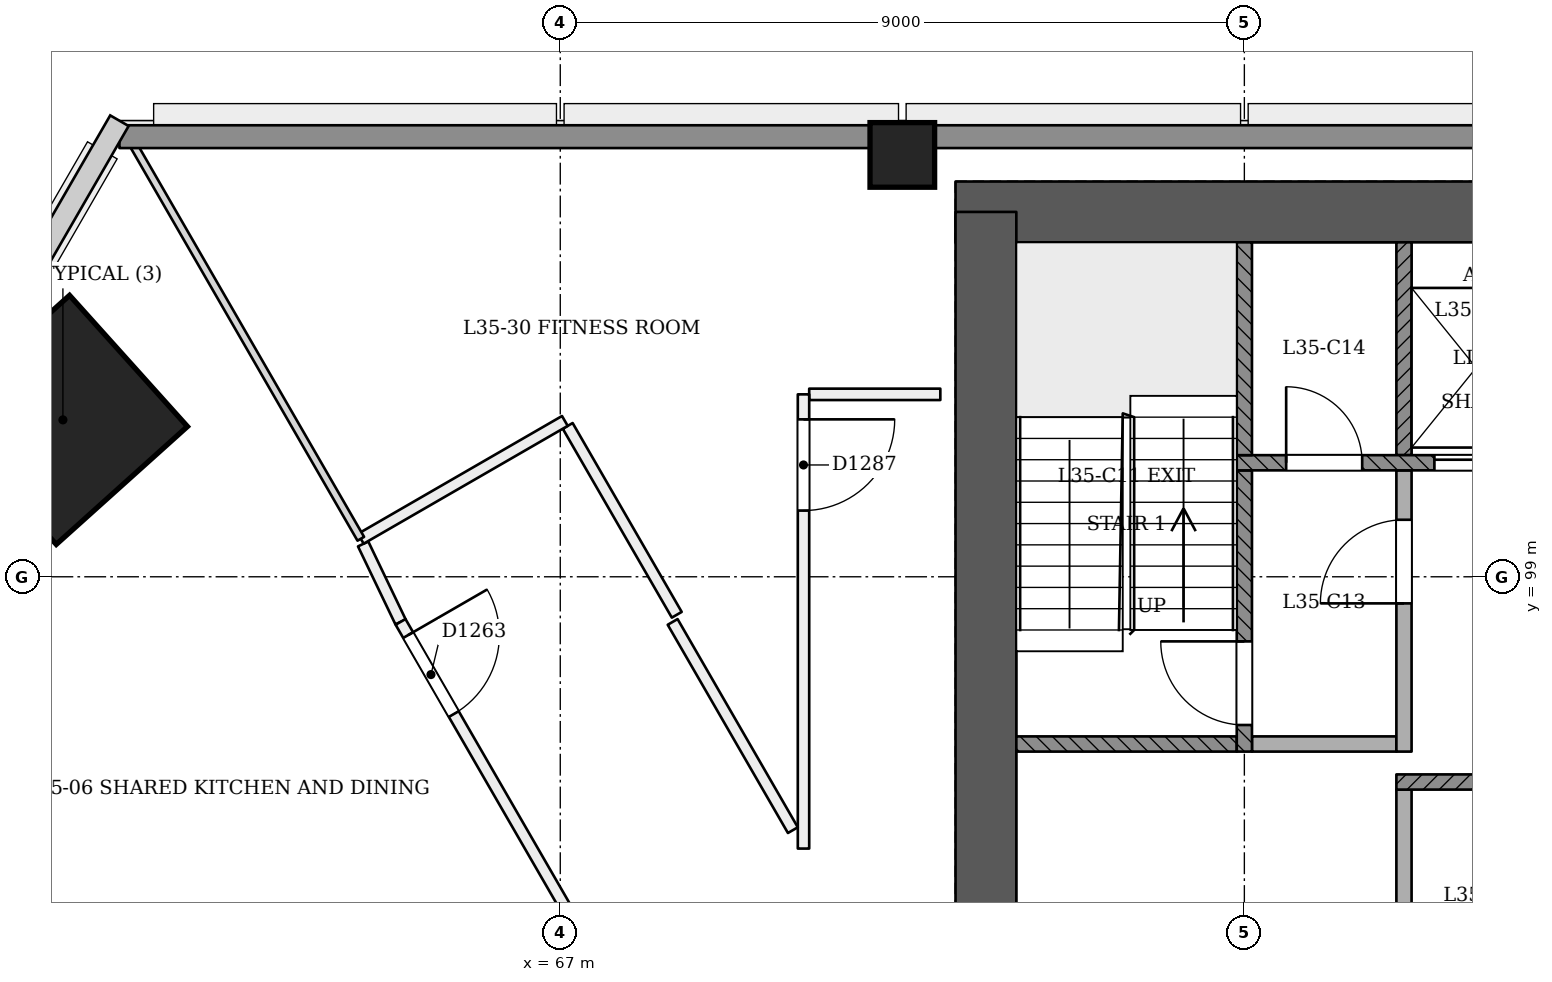
"""IFC4 building model, lengths in metres.
Left out: names, types, materials, properties, quantities, classifications, styles, units other than length and angle.
Written with IfcOpenShell. Run it as: python <this file> out.ifc"""

import sys

from ifc_helpers import new_model, si_unit, direction, frame, frame_2d, origin, origin_2d, place, context, subcontext, project, spatial, rectangle, extrude, element, fill, save


model = new_model("IFC4")
c1 = context("Model", 3, precision=1e-05, world=origin(), true_north=direction((0.0, 1.0)))
c2 = subcontext(c1, "Body", "Model", "MODEL_VIEW")
j1 = project(units=[si_unit("LENGTHUNIT", "METRE"), si_unit("PLANEANGLEUNIT", "RADIAN")], contexts=[c1])
p1 = place(None, origin())
s1 = spatial("IfcSite", under=j1, at=p1, CompositionType="ELEMENT")
p2 = place(p1, origin())
s2 = spatial("IfcBuilding", under=s1, at=p2, CompositionType="ELEMENT")
p3 = place(p2, frame((0.0, 0.0, 138.6)))
s3 = spatial("IfcBuildingStorey", under=s2, at=p3, CompositionType="ELEMENT", Elevation=138.6)
p4 = place(p3, frame((97.4, 103.8, 0.0), z_axis=(0.0, 0.0, 1.0), x_axis=(-1.0, 0.0, 0.0)))
e1 = element("IfcWall", 1, at=p4, inside=s3, PredefinedType="SHEAR", context=c2, shape_type="SweptSolid", body=[
    extrude(rectangle(XDim=25.2, YDim=0.8, at=frame_2d((12.6, 0.0))), origin(), (0.0, 0.0, 1.0), 3.6),
])
p5 = place(p3, frame((72.6, 103.8, 0.0), z_axis=(0.0, 0.0, 1.0), x_axis=(0.0, -1.0, 0.0)))
e2 = element("IfcWall", 2, at=p5, inside=s3, PredefinedType="SHEAR", context=c2, shape_type="SweptSolid", body=[
    extrude(rectangle(XDim=11.2, YDim=0.8, at=frame_2d((5.6, 0.0))), origin(), (0.0, 0.0, 1.0), 3.6),
])
p6 = place(p3, frame((60.423, 101.053, 0.0), z_axis=(0.028403721265, 0.009287135593, 0.999553389135), x_axis=(-0.866201877506, 0.49929479911, 0.019975259356)))
e3 = element("IfcColumn", 3, at=p6, inside=s3, PredefinedType="COLUMN", context=c2, shape_type="SweptSolid", body=[
    extrude(rectangle(XDim=2.32, YDim=2.32, at=origin_2d()), origin(), (0.0, 0.0, 1.0), 3.602),
])
p7 = place(p3, frame((71.5, 104.55, 0.0), z_axis=(0.0, 0.0, 1.0), x_axis=(1.0, 0.0, 0.0)))
e4 = element("IfcColumn", 4, at=p7, inside=s3, PredefinedType="COLUMN", context=c2, shape_type="SweptSolid", body=[
    extrude(rectangle(XDim=0.85, YDim=0.85, at=origin_2d()), origin(), (0.0, 0.0, 1.0), 3.6),
])
p8 = place(p3, frame((64.407, 99.432, 0.0), z_axis=(0.0, 0.0, 1.0), x_axis=(0.432647343943, -0.901563240033, 0.0)))
e5 = element("IfcWall", 5, at=p8, inside=s3, PredefinedType="PARTITIONING", context=c2, shape_type="SweptSolid", body=[
    extrude(rectangle(XDim=1.138, YDim=0.15, at=frame_2d((0.569, 0.0))), origin(), (0.0, 0.0, 1.0), 3.15),
])
p9 = place(p3, frame((64.899, 98.406, 0.0), z_axis=(0.0, 0.0, 1.0), x_axis=(0.499995137693, -0.86602821102, 0.0)))
e6 = element("IfcWall", 6, at=p9, inside=s3, PredefinedType="PARTITIONING", context=c2, shape_type="SweptSolid", body=[
    extrude(rectangle(XDim=40.094, YDim=0.15, at=frame_2d((20.047, 0.0))), origin(), (0.0, 0.0, 1.0), 2.75),
])
p10 = place(p9, frame((0.2, 0.0, 0.0)))
e7 = element("IfcOpeningElement", 7, at=p10, cuts=e6, PredefinedType="OPENING", context=c2, shape_type="SweptSolid", body=[
    extrude(rectangle(XDim=1.2, YDim=2.1, at=frame_2d((0.6, 1.05))), frame((0.0, 0.085, 0.0), z_axis=(0.0, -1.0, 0.0), x_axis=(1.0, 0.0, 0.0)), (0.0, 0.0, 1.0), 0.171),
])
p11 = place(p9, frame((9.442, 0.0, 0.0)))
e8 = element("IfcOpeningElement", 8, at=p11, cuts=e6, PredefinedType="OPENING", context=c2, shape_type="SweptSolid", body=[
    extrude(rectangle(XDim=1.0, YDim=2.1, at=frame_2d((0.5, 1.05))), frame((0.0, 0.085, 0.0), z_axis=(0.0, -1.0, 0.0), x_axis=(1.0, 0.0, 0.0)), (0.0, 0.0, 1.0), 0.171),
])
p12 = place(p9, frame((11.652, 0.0, 0.0)))
e9 = element("IfcOpeningElement", 9, at=p12, cuts=e6, PredefinedType="OPENING", context=c2, shape_type="SweptSolid", body=[
    extrude(rectangle(XDim=1.0, YDim=2.1, at=frame_2d((0.5, 1.05))), frame((0.0, 0.085, 0.0), z_axis=(0.0, -1.0, 0.0), x_axis=(1.0, 0.0, 0.0)), (0.0, 0.0, 1.0), 0.171),
])
p13 = place(p9, frame((19.447, 0.0, 0.0)))
e10 = element("IfcOpeningElement", 10, at=p13, cuts=e6, PredefinedType="OPENING", context=c2, shape_type="SweptSolid", body=[
    extrude(rectangle(XDim=1.2, YDim=2.1, at=frame_2d((0.6, 1.05))), frame((0.0, 0.085, 0.0), z_axis=(0.0, -1.0, 0.0), x_axis=(1.0, 0.0, 0.0)), (0.0, 0.0, 1.0), 0.171),
])
p14 = place(p9, frame((27.327, 0.0, 0.0)))
e11 = element("IfcOpeningElement", 11, at=p14, cuts=e6, PredefinedType="OPENING", context=c2, shape_type="SweptSolid", body=[
    extrude(rectangle(XDim=1.0, YDim=2.1, at=frame_2d((0.5, 1.05))), frame((0.0, 0.085, 0.0), z_axis=(0.0, -1.0, 0.0), x_axis=(1.0, 0.0, 0.0)), (0.0, 0.0, 1.0), 0.171),
])
p15 = place(p9, frame((31.847, 0.0, 0.0)))
e12 = element("IfcOpeningElement", 12, at=p15, cuts=e6, PredefinedType="OPENING", context=c2, shape_type="SweptSolid", body=[
    extrude(rectangle(XDim=1.2, YDim=2.1, at=frame_2d((0.6, 1.05))), frame((0.0, 0.085, 0.0), z_axis=(0.0, -1.0, 0.0), x_axis=(1.0, 0.0, 0.0)), (0.0, 0.0, 1.0), 0.171),
])
p16 = place(p9, frame((38.558, 0.0, 0.0)))
e13 = element("IfcOpeningElement", 13, at=p16, cuts=e6, PredefinedType="OPENING", context=c2, shape_type="SweptSolid", body=[
    extrude(rectangle(XDim=1.0, YDim=2.1, at=frame_2d((0.5, 1.05))), frame((0.0, 0.085, 0.0), z_axis=(0.0, -1.0, 0.0), x_axis=(1.0, 0.0, 0.0)), (0.0, 0.0, 1.0), 0.171),
])
p17 = place(p3, frame((72.0, 101.4, 0.0), z_axis=(0.0, 0.0, 1.0), x_axis=(-1.0, 0.0, 0.0)))
e14 = element("IfcWall", 14, at=p17, inside=s3, PredefinedType="PARTITIONING", context=c2, shape_type="SweptSolid", body=[
    extrude(rectangle(XDim=1.725, YDim=0.15, at=frame_2d((0.863, 0.0))), origin(), (0.0, 0.0, 1.0), 3.15),
])
p18 = place(p3, frame((70.2, 101.4, 0.0), z_axis=(0.0, 0.0, 1.0), x_axis=(0.0, -1.0, 0.0)))
e15 = element("IfcWall", 15, at=p18, inside=s3, PredefinedType="PARTITIONING", context=c2, shape_type="SweptSolid", body=[
    extrude(rectangle(XDim=5.976, YDim=0.15, at=frame_2d((2.988, 0.0))), origin(), (0.0, 0.0, 1.0), 3.15),
])
p19 = place(p18, frame((0.329, 0.0, 0.0)))
e16 = element("IfcOpeningElement", 16, at=p19, cuts=e15, PredefinedType="OPENING", context=c2, shape_type="SweptSolid", body=[
    extrude(rectangle(XDim=1.2, YDim=2.1, at=frame_2d((0.6, 1.05))), frame((0.0, 0.085, 0.0), z_axis=(0.0, -1.0, 0.0), x_axis=(1.0, 0.0, 0.0)), (0.0, 0.0, 1.0), 0.171),
])
p20 = place(p3, frame((70.06, 95.667, 0.0), z_axis=(0.0, 0.0, 1.0), x_axis=(-0.499998569178, 0.866026229868, 0.0)))
e17 = element("IfcWall", 17, at=p20, inside=s3, PredefinedType="PARTITIONING", context=c2, shape_type="SweptSolid", body=[
    extrude(rectangle(XDim=3.164, YDim=0.15, at=frame_2d((1.582, 0.0))), origin(), (0.0, 0.0, 1.0), 3.15),
])
p21 = place(p3, frame((68.532, 98.5, 0.0), z_axis=(0.0, 0.0, 1.0), x_axis=(-0.499945861543, 0.866056658381, 0.0)))
e18 = element("IfcWall", 18, at=p21, inside=s3, PredefinedType="PARTITIONING", context=c2, shape_type="SweptSolid", body=[
    extrude(rectangle(XDim=2.869, YDim=0.15, at=frame_2d((1.435, 0.0))), origin(), (0.0, 0.0, 1.0), 3.15),
])
p22 = place(p3, frame((67.06, 101.05, 0.0), z_axis=(0.0, 0.0, 1.0), x_axis=(-0.86600983753, -0.500026960575, 0.0)))
e19 = element("IfcWall", 19, at=p22, inside=s3, PredefinedType="PARTITIONING", context=c2, shape_type="SweptSolid", body=[
    extrude(rectangle(XDim=3.1, YDim=0.15, at=frame_2d((1.55, 0.0))), origin(), (0.0, 0.0, 1.0), 3.15),
])
p23 = place(p3, frame((64.376, 99.5, 0.0), z_axis=(0.0, 0.0, 1.0), x_axis=(-0.500004896655, 0.866022576681, 0.0)))
e20 = element("IfcWall", 20, at=p23, inside=s3, PredefinedType="PARTITIONING", context=c2, shape_type="SweptSolid", body=[
    extrude(rectangle(XDim=6.235, YDim=0.1, at=frame_2d((3.118, 0.0))), origin(), (0.0, 0.0, 1.0), 2.65),
])
p24 = place(p3, frame((61.2, 104.79, 0.0), z_axis=(0.0, 0.0, 1.0), x_axis=(1.0, 0.0, 0.0)))
e21 = element("IfcWall", 21, at=p24, inside=s3, PredefinedType="SOLIDWALL", context=c2, shape_type="SweptSolid", body=[
    extrude(rectangle(XDim=47.6, YDim=0.3, at=frame_2d((23.8, 0.0))), origin(), (0.0, 0.0, 1.0), 2.65),
])
p25 = place(p3, frame((78.1, 93.4, 0.0), z_axis=(0.0, 0.0, 1.0), x_axis=(0.0, 1.0, 0.0)))
e22 = element("IfcWall", 22, at=p25, inside=s3, PredefinedType="PARTITIONING", context=c2, shape_type="SweptSolid", body=[
    extrude(rectangle(XDim=2.8, YDim=0.2, at=frame_2d((1.4, 0.0))), origin(), (0.0, 0.0, 1.0), 3.15),
])
p26 = place(p3, frame((78.0, 96.3, 0.0), z_axis=(0.0, 0.0, 1.0), x_axis=(1.0, 0.0, 0.0)))
e23 = element("IfcWall", 23, at=p26, inside=s3, PredefinedType="SOLIDWALL", context=c2, shape_type="SweptSolid", body=[
    extrude(rectangle(XDim=7.8, YDim=0.2, at=frame_2d((3.9, 0.0))), origin(), (0.0, 0.0, 1.0), 3.15),
])
p27 = place(p26, frame((1.5, 0.0, 0.0)))
e24 = element("IfcOpeningElement", 24, at=p27, cuts=e23, PredefinedType="OPENING", context=c2, shape_type="SweptSolid", body=[
    extrude(rectangle(XDim=1.0, YDim=2.1, at=frame_2d((0.5, 1.05))), frame((0.0, 0.11, 0.0), z_axis=(0.0, -1.0, 0.0), x_axis=(1.0, 0.0, 0.0)), (0.0, 0.0, 1.0), 0.221),
])
p28 = place(p3, frame((73.0, 96.8, 0.0), z_axis=(0.0, 0.0, 1.0), x_axis=(1.0, 0.0, 0.0)))
e25 = element("IfcWall", 25, at=p28, inside=s3, PredefinedType="SOLIDWALL", context=c2, shape_type="SweptSolid", body=[
    extrude(rectangle(XDim=2.9, YDim=0.2, at=frame_2d((1.45, 0.0))), origin(), (0.0, 0.0, 1.0), 3.15),
])
p29 = place(p3, frame((76.0, 96.7, 0.0), z_axis=(0.0, 0.0, 1.0), x_axis=(0.0, 1.0, 0.0)))
e26 = element("IfcWall", 26, at=p29, inside=s3, PredefinedType="SOLIDWALL", context=c2, shape_type="SweptSolid", body=[
    extrude(rectangle(XDim=3.7, YDim=0.2, at=frame_2d((1.85, 0.0))), origin(), (0.0, 0.0, 1.0), 3.15),
])
p30 = place(p29, frame((0.35, 0.0, 0.0)))
e27 = element("IfcOpeningElement", 27, at=p30, cuts=e26, PredefinedType="OPENING", context=c2, shape_type="SweptSolid", body=[
    extrude(rectangle(XDim=1.1, YDim=2.1, at=frame_2d((0.55, 1.05))), frame((0.0, 0.11, 0.0), z_axis=(0.0, -1.0, 0.0), x_axis=(1.0, 0.0, 0.0)), (0.0, 0.0, 1.0), 0.221),
])
p31 = place(p3, frame((76.1, 96.8, 0.0), z_axis=(0.0, 0.0, 1.0), x_axis=(1.0, 0.0, 0.0)))
e28 = element("IfcWall", 28, at=p31, inside=s3, PredefinedType="PARTITIONING", context=c2, shape_type="SweptSolid", body=[
    extrude(rectangle(XDim=1.9, YDim=0.2, at=frame_2d((0.95, 0.0))), origin(), (0.0, 0.0, 1.0), 3.15),
])
p32 = place(p3, frame((78.1, 96.7, 0.0), z_axis=(0.0, 0.0, 1.0), x_axis=(0.0, 1.0, 0.0)))
e29 = element("IfcWall", 29, at=p32, inside=s3, PredefinedType="PARTITIONING", context=c2, shape_type="SweptSolid", body=[
    extrude(rectangle(XDim=3.7, YDim=0.2, at=frame_2d((1.85, 0.0))), origin(), (0.0, 0.0, 1.0), 3.15),
])
p33 = place(p32, frame((1.95, 0.0, 0.0)))
e30 = element("IfcOpeningElement", 30, at=p33, cuts=e29, PredefinedType="OPENING", context=c2, shape_type="SweptSolid", body=[
    extrude(rectangle(XDim=1.1, YDim=2.1, at=frame_2d((0.55, 1.05))), frame((0.0, 0.11, 0.0), z_axis=(0.0, -1.0, 0.0), x_axis=(1.0, 0.0, 0.0)), (0.0, 0.0, 1.0), 0.221),
])
p34 = place(p3, frame((75.9, 100.5, 0.0), z_axis=(0.0, 0.0, 1.0), x_axis=(1.0, 0.0, 0.0)))
e31 = element("IfcWall", 31, at=p34, inside=s3, PredefinedType="SOLIDWALL", context=c2, shape_type="SweptSolid", body=[
    extrude(rectangle(XDim=18.2, YDim=0.2, at=frame_2d((9.1, 0.0))), origin(), (0.0, 0.0, 1.0), 3.15),
])
p35 = place(p34, frame((2.6, 0.0, 0.0)))
e32 = element("IfcOpeningElement", 32, at=p35, cuts=e31, PredefinedType="OPENING", context=c2, shape_type="SweptSolid", body=[
    extrude(rectangle(XDim=1.1, YDim=2.1, at=frame_2d((0.55, 1.05))), frame((0.0, 0.11, 0.0), z_axis=(0.0, -1.0, 0.0), x_axis=(1.0, 0.0, 0.0)), (0.0, 0.0, 1.0), 0.221),
])
p36 = place(p34, frame((4.5, 0.0, 0.0)))
e33 = element("IfcOpeningElement", 33, at=p36, cuts=e31, PredefinedType="OPENING", context=c2, shape_type="SweptSolid", body=[
    extrude(rectangle(XDim=1.1, YDim=2.1, at=frame_2d((0.55, 1.05))), frame((0.0, 0.11, 0.0), z_axis=(0.0, -1.0, 0.0), x_axis=(1.0, 0.0, 0.0)), (0.0, 0.0, 1.0), 0.221),
])
p37 = place(p34, frame((6.4, 0.0, 0.0)))
e34 = element("IfcOpeningElement", 34, at=p37, cuts=e31, PredefinedType="OPENING", context=c2, shape_type="SweptSolid", body=[
    extrude(rectangle(XDim=1.1, YDim=2.1, at=frame_2d((0.55, 1.05))), frame((0.0, 0.11, 0.0), z_axis=(0.0, -1.0, 0.0), x_axis=(1.0, 0.0, 0.0)), (0.0, 0.0, 1.0), 0.221),
])
p38 = place(p34, frame((8.3, 0.0, 0.0)))
e35 = element("IfcOpeningElement", 35, at=p38, cuts=e31, PredefinedType="OPENING", context=c2, shape_type="SweptSolid", body=[
    extrude(rectangle(XDim=1.1, YDim=2.1, at=frame_2d((0.55, 1.05))), frame((0.0, 0.11, 0.0), z_axis=(0.0, -1.0, 0.0), x_axis=(1.0, 0.0, 0.0)), (0.0, 0.0, 1.0), 0.221),
])
p39 = place(p34, frame((10.2, 0.0, 0.0)))
e36 = element("IfcOpeningElement", 36, at=p39, cuts=e31, PredefinedType="OPENING", context=c2, shape_type="SweptSolid", body=[
    extrude(rectangle(XDim=1.1, YDim=2.1, at=frame_2d((0.55, 1.05))), frame((0.0, 0.11, 0.0), z_axis=(0.0, -1.0, 0.0), x_axis=(1.0, 0.0, 0.0)), (0.0, 0.0, 1.0), 0.221),
])
p40 = place(p34, frame((12.1, 0.0, 0.0)))
e37 = element("IfcOpeningElement", 37, at=p40, cuts=e31, PredefinedType="OPENING", context=c2, shape_type="SweptSolid", body=[
    extrude(rectangle(XDim=1.1, YDim=2.1, at=frame_2d((0.55, 1.05))), frame((0.0, 0.11, 0.0), z_axis=(0.0, -1.0, 0.0), x_axis=(1.0, 0.0, 0.0)), (0.0, 0.0, 1.0), 0.221),
])
p41 = place(p34, frame((14.0, 0.0, 0.0)))
e38 = element("IfcOpeningElement", 38, at=p41, cuts=e31, PredefinedType="OPENING", context=c2, shape_type="SweptSolid", body=[
    extrude(rectangle(XDim=1.1, YDim=2.1, at=frame_2d((0.55, 1.05))), frame((0.0, 0.11, 0.0), z_axis=(0.0, -1.0, 0.0), x_axis=(1.0, 0.0, 0.0)), (0.0, 0.0, 1.0), 0.221),
])
p42 = place(p34, frame((0.65, 0.0, 0.0)))
e39 = element("IfcOpeningElement", 39, at=p42, cuts=e31, PredefinedType="OPENING", context=c2, shape_type="SweptSolid", body=[
    extrude(rectangle(XDim=1.0, YDim=2.1, at=frame_2d((0.5, 1.05))), frame((0.0, 0.11, 0.0), z_axis=(0.0, -1.0, 0.0), x_axis=(1.0, 0.0, 0.0)), (0.0, 0.0, 1.0), 0.221),
])
p43 = place(p34, frame((16.3, 0.0, 0.0)))
e40 = element("IfcOpeningElement", 40, at=p43, cuts=e31, PredefinedType="OPENING", context=c2, shape_type="SweptSolid", body=[
    extrude(rectangle(XDim=1.0, YDim=2.1, at=frame_2d((0.5, 1.05))), frame((0.0, 0.11, 0.0), z_axis=(0.0, -1.0, 0.0), x_axis=(1.0, 0.0, 0.0)), (0.0, 0.0, 1.0), 0.221),
])
for number, where, z_axis, x_axis in (
    (41, (76.0, 100.6, 0.0), (0.0, 0.0, 1.0), (0.0, 1.0, 0.0)),
    (42, (78.1, 100.6, 0.0), (0.0, 0.0, 1.0), (0.0, 1.0, 0.0)),
):
    element("IfcWall", number, at=place(p3, frame(where, z_axis=z_axis, x_axis=x_axis)), inside=s3, PredefinedType="SOLIDWALL", context=c2, shape_type="SweptSolid", body=[
        extrude(rectangle(XDim=2.8, YDim=0.2, at=frame_2d((1.4, 0.0))), origin(), (0.0, 0.0, 1.0), 3.15),
    ])
p44 = place(p10, origin())
e43 = element("IfcDoor", 43, at=p44, inside=s3, OperationType="SINGLE_SWING_LEFT", PredefinedType="NOTDEFINED", context=c2, shape_type="SweptSolid", body=[
    extrude(rectangle(XDim=1.2, YDim=2.1, at=frame_2d((0.6, 1.05))), frame((0.0, 0.025, 0.0), z_axis=(0.0, -1.0, 0.0), x_axis=(1.0, 0.0, 0.0)), (0.0, 0.0, 1.0), 0.05),
])
fill(e7, e43)
p45 = place(p19, origin())
e44 = element("IfcDoor", 44, at=p45, inside=s3, OperationType="SINGLE_SWING_LEFT", PredefinedType="NOTDEFINED", context=c2, shape_type="SweptSolid", body=[
    extrude(rectangle(XDim=1.2, YDim=2.1, at=frame_2d((0.6, 1.05))), frame((0.0, 0.025, 0.0), z_axis=(0.0, -1.0, 0.0), x_axis=(1.0, 0.0, 0.0)), (0.0, 0.0, 1.0), 0.05),
])
fill(e16, e44)
p46 = place(p35, origin())
e45 = element("IfcDoor", 45, at=p46, inside=s3, OperationType="SLIDING_TO_RIGHT", PredefinedType="NOTDEFINED", context=c2, shape_type="SweptSolid", body=[
    extrude(rectangle(XDim=1.1, YDim=2.1, at=frame_2d((0.55, 1.05))), frame((0.0, 0.025, 0.0), z_axis=(0.0, -1.0, 0.0), x_axis=(1.0, 0.0, 0.0)), (0.0, 0.0, 1.0), 0.05),
])
fill(e32, e45)
p47 = place(p30, origin())
e46 = element("IfcDoor", 46, at=p47, inside=s3, OperationType="SINGLE_SWING_RIGHT", PredefinedType="NOTDEFINED", context=c2, shape_type="SweptSolid", body=[
    extrude(rectangle(XDim=1.1, YDim=2.1, at=frame_2d((0.55, 1.05))), frame((0.0, 0.025, 0.0), z_axis=(0.0, -1.0, 0.0), x_axis=(1.0, 0.0, 0.0)), (0.0, 0.0, 1.0), 0.05),
])
fill(e27, e46)
p48 = place(p33, origin())
e47 = element("IfcDoor", 47, at=p48, inside=s3, OperationType="SINGLE_SWING_LEFT", PredefinedType="NOTDEFINED", context=c2, shape_type="SweptSolid", body=[
    extrude(rectangle(XDim=1.1, YDim=2.1, at=frame_2d((0.55, 1.05))), frame((0.0, 0.025, 0.0), z_axis=(0.0, -1.0, 0.0), x_axis=(1.0, 0.0, 0.0)), (0.0, 0.0, 1.0), 0.05),
])
fill(e30, e47)
p49 = place(p42, origin())
e48 = element("IfcDoor", 48, at=p49, inside=s3, OperationType="SINGLE_SWING_LEFT", PredefinedType="NOTDEFINED", context=c2, shape_type="SweptSolid", body=[
    extrude(rectangle(XDim=1.0, YDim=2.1, at=frame_2d((0.5, 1.05))), frame((0.0, 0.025, 0.0), z_axis=(0.0, -1.0, 0.0), x_axis=(1.0, 0.0, 0.0)), (0.0, 0.0, 1.0), 0.05),
])
fill(e39, e48)
save(model, sys.argv[1])
